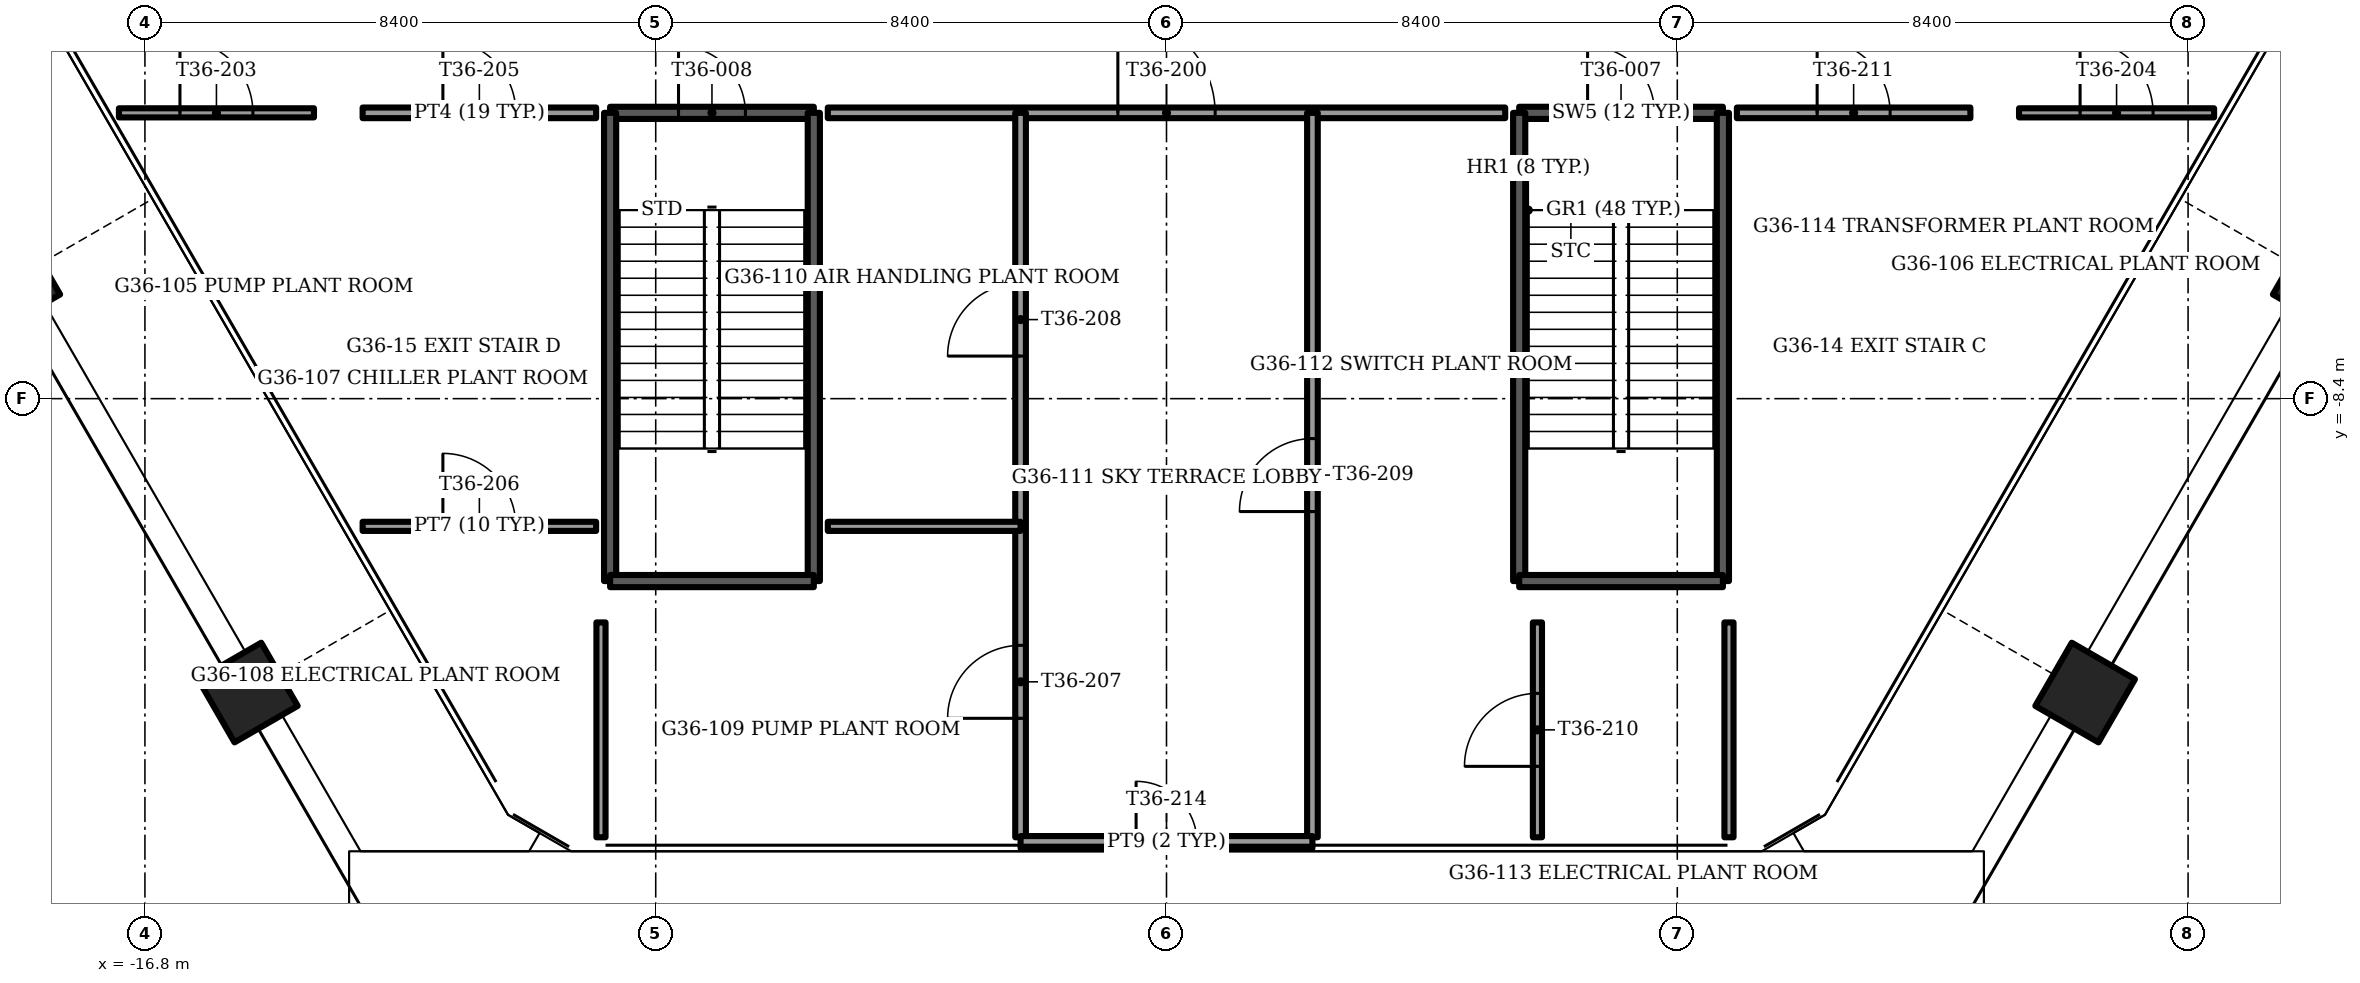
"""IFC4 building model, lengths in metres.
Left out: names, types, materials, properties, quantities, classifications, styles, units other than length and angle.
Written with IfcOpenShell. Run it as: python <this file> out.ifc"""

import sys

from ifc_helpers import new_model, si_unit, direction, frame, frame_2d, origin, origin_2d, place, context, subcontext, project, spatial, rectangle, extrude, element, fill, save


model = new_model("IFC4")
c1 = context("Model", 3, precision=1e-05, world=origin(), true_north=direction((0.0, 1.0)))
c2 = subcontext(c1, "Body", "Model", "MODEL_VIEW")
j1 = project(units=[si_unit("LENGTHUNIT", "METRE"), si_unit("PLANEANGLEUNIT", "RADIAN")], contexts=[c1])
p1 = place(None, origin())
s1 = spatial("IfcSite", under=j1, at=p1, CompositionType="ELEMENT")
p2 = place(p1, origin())
s2 = spatial("IfcBuilding", under=s1, at=p2, CompositionType="ELEMENT")
p3 = place(p2, frame((0.0, 0.0, 146.0)))
s3 = spatial("IfcBuildingStorey", under=s2, at=p3, CompositionType="ELEMENT", Elevation=146.0)
for number, where, z_axis, x_axis in (
    (1, (-19.014, -6.467, -1.2), (0.0, 0.0, 1.0), (-0.5, 0.866, 0.0)),
    (2, (-15.107, -13.233, -1.2), (0.0, 0.0, 1.0), (-0.5, 0.866, 0.0)),
    (3, (15.107, -13.233, -1.2), (0.0, 0.0, 1.0), (-0.5, -0.866, 0.0)),
    (4, (19.014, -6.467, -1.2), (0.0, 0.0, 1.0), (-0.5, -0.866, 0.0)),
):
    element("IfcColumn", number, at=place(p3, frame(where, z_axis=z_axis, x_axis=x_axis)), inside=s3, PredefinedType="COLUMN", context=c2, shape_type="SweptSolid", body=[
        extrude(rectangle(XDim=1.2, YDim=1.2, at=origin_2d()), origin(), (0.0, 0.0, 1.0), 5.0),
    ])
p4 = place(p3, frame((5.8, -3.7, -0.3), z_axis=(0.0, 0.0, 1.0), x_axis=(1.0, 0.0, 0.0)))
e5 = element("IfcWall", 5, at=p4, inside=s3, PredefinedType="SOLIDWALL", context=c2, shape_type="SweptSolid", body=[
    extrude(rectangle(XDim=3.35, YDim=0.2, at=frame_2d((1.675, 0.0))), origin(), (0.0, 0.0, 1.0), 5.0),
])
p5 = place(p4, frame((1.125, 0.0, 0.0)))
e6 = element("IfcOpeningElement", 6, at=p5, cuts=e5, PredefinedType="OPENING", context=c2, shape_type="SweptSolid", body=[
    extrude(rectangle(XDim=1.1, YDim=2.1, at=frame_2d((0.55, 1.05))), frame((0.0, 0.1, 0.0), z_axis=(0.0, -1.0, 0.0), x_axis=(1.0, 0.0, 0.0)), (0.0, 0.0, 1.0), 0.2),
])
for number, where, z_axis, x_axis in (
    (7, (5.8, -3.7, -0.3), (0.0, 0.0, 1.0), (0.0, -1.0, 0.0)),
    (8, (9.15, -3.7, -0.3), (0.0, 0.0, 1.0), (0.0, -1.0, 0.0)),
):
    element("IfcWall", number, at=place(p3, frame(where, z_axis=z_axis, x_axis=x_axis)), inside=s3, PredefinedType="SOLIDWALL", context=c2, shape_type="SweptSolid", body=[
        extrude(rectangle(XDim=7.7, YDim=0.2, at=frame_2d((3.85, 0.0))), origin(), (0.0, 0.0, 1.0), 5.0),
    ])
p6 = place(p3, frame((5.8, -11.4, -0.3), z_axis=(0.0, 0.0, 1.0), x_axis=(1.0, 0.0, 0.0)))
e9 = element("IfcWall", 9, at=p6, inside=s3, PredefinedType="SOLIDWALL", context=c2, shape_type="SweptSolid", body=[
    extrude(rectangle(XDim=3.35, YDim=0.2, at=frame_2d((1.675, 0.0))), origin(), (0.0, 0.0, 1.0), 5.0),
])
p7 = place(p3, frame((-9.15, -3.7, -0.3), z_axis=(0.0, 0.0, 1.0), x_axis=(1.0, 0.0, 0.0)))
e10 = element("IfcWall", 10, at=p7, inside=s3, PredefinedType="SOLIDWALL", context=c2, shape_type="SweptSolid", body=[
    extrude(rectangle(XDim=3.35, YDim=0.2, at=frame_2d((1.675, 0.0))), origin(), (0.0, 0.0, 1.0), 5.0),
])
p8 = place(p7, frame((1.125, 0.0, 0.0)))
e11 = element("IfcOpeningElement", 11, at=p8, cuts=e10, PredefinedType="OPENING", context=c2, shape_type="SweptSolid", body=[
    extrude(rectangle(XDim=1.1, YDim=2.1, at=frame_2d((0.55, 1.05))), frame((0.0, 0.1, 0.0), z_axis=(0.0, -1.0, 0.0), x_axis=(1.0, 0.0, 0.0)), (0.0, 0.0, 1.0), 0.2),
])
for number, where, z_axis, x_axis in (
    (12, (-9.15, -3.7, -0.3), (0.0, 0.0, 1.0), (0.0, -1.0, 0.0)),
    (13, (-5.8, -3.7, -0.3), (0.0, 0.0, 1.0), (0.0, -1.0, 0.0)),
):
    element("IfcWall", number, at=place(p3, frame(where, z_axis=z_axis, x_axis=x_axis)), inside=s3, PredefinedType="SOLIDWALL", context=c2, shape_type="SweptSolid", body=[
        extrude(rectangle(XDim=7.7, YDim=0.2, at=frame_2d((3.85, 0.0))), origin(), (0.0, 0.0, 1.0), 5.0),
    ])
p9 = place(p3, frame((-9.15, -11.4, -0.3), z_axis=(0.0, 0.0, 1.0), x_axis=(1.0, 0.0, 0.0)))
e14 = element("IfcWall", 14, at=p9, inside=s3, PredefinedType="SOLIDWALL", context=c2, shape_type="SweptSolid", body=[
    extrude(rectangle(XDim=3.35, YDim=0.2, at=frame_2d((1.675, 0.0))), origin(), (0.0, 0.0, 1.0), 5.0),
])
p10 = place(p3, frame((-13.22, -3.7, 0.0), z_axis=(0.0, 0.0, 1.0), x_axis=(1.0, 0.0, 0.0)))
e15 = element("IfcWall", 15, at=p10, inside=s3, PredefinedType="PARTITIONING", context=c2, shape_type="SweptSolid", body=[
    extrude(rectangle(XDim=3.84, YDim=0.175, at=frame_2d((1.92, 0.0))), origin(), (0.0, 0.0, 1.0), 4.7),
])
p11 = place(p10, frame((1.32, 0.0, 0.0)))
e16 = element("IfcOpeningElement", 16, at=p11, cuts=e15, PredefinedType="OPENING", context=c2, shape_type="SweptSolid", body=[
    extrude(rectangle(XDim=1.2, YDim=2.1, at=frame_2d((0.6, 1.05))), frame((0.0, 0.087, 0.0), z_axis=(0.0, -1.0, 0.0), x_axis=(1.0, 0.0, 0.0)), (0.0, 0.0, 1.0), 0.175),
])
p12 = place(p3, frame((-5.57, -3.7, 0.0), z_axis=(0.0, 0.0, 1.0), x_axis=(1.0, 0.0, 0.0)))
e17 = element("IfcWall", 17, at=p12, inside=s3, PredefinedType="PARTITIONING", context=c2, shape_type="SweptSolid", body=[
    extrude(rectangle(XDim=11.14, YDim=0.175, at=frame_2d((5.57, 0.0))), origin(), (0.0, 0.0, 1.0), 4.7),
])
p13 = place(p12, frame((4.77, 0.0, 0.0)))
e18 = element("IfcOpeningElement", 18, at=p13, cuts=e17, PredefinedType="OPENING", context=c2, shape_type="SweptSolid", body=[
    extrude(rectangle(XDim=1.6, YDim=2.1, at=frame_2d((0.8, 1.05))), frame((0.0, 0.087, 0.0), z_axis=(0.0, -1.0, 0.0), x_axis=(1.0, 0.0, 0.0)), (0.0, 0.0, 1.0), 0.175),
])
p14 = place(p3, frame((9.38, -3.7, 0.0), z_axis=(0.0, 0.0, 1.0), x_axis=(1.0, 0.0, 0.0)))
e19 = element("IfcWall", 19, at=p14, inside=s3, PredefinedType="PARTITIONING", context=c2, shape_type="SweptSolid", body=[
    extrude(rectangle(XDim=3.84, YDim=0.175, at=frame_2d((1.92, 0.0))), origin(), (0.0, 0.0, 1.0), 4.7),
])
p15 = place(p14, frame((1.32, 0.0, 0.0)))
e20 = element("IfcOpeningElement", 20, at=p15, cuts=e19, PredefinedType="OPENING", context=c2, shape_type="SweptSolid", body=[
    extrude(rectangle(XDim=1.2, YDim=2.1, at=frame_2d((0.6, 1.05))), frame((0.0, 0.087, 0.0), z_axis=(0.0, -1.0, 0.0), x_axis=(1.0, 0.0, 0.0)), (0.0, 0.0, 1.0), 0.175),
])
p16 = place(p3, frame((-2.4, -15.614, 0.0), z_axis=(0.0, 0.0, 1.0), x_axis=(0.0, 1.0, 0.0)))
e21 = element("IfcWall", 21, at=p16, inside=s3, PredefinedType="PARTITIONING", context=c2, shape_type="SweptSolid", body=[
    extrude(rectangle(XDim=11.914, YDim=0.175, at=frame_2d((5.957, 0.0))), origin(), (0.0, 0.0, 1.0), 4.7),
])
p17 = place(p16, frame((1.957, 0.0, 0.0)))
e22 = element("IfcOpeningElement", 22, at=p17, cuts=e21, PredefinedType="OPENING", context=c2, shape_type="SweptSolid", body=[
    extrude(rectangle(XDim=1.2, YDim=2.1, at=frame_2d((0.6, 1.05))), frame((0.0, 0.087, 0.0), z_axis=(0.0, -1.0, 0.0), x_axis=(1.0, 0.0, 0.0)), (0.0, 0.0, 1.0), 0.175),
])
p18 = place(p16, frame((7.914, 0.0, 0.0)))
e23 = element("IfcOpeningElement", 23, at=p18, cuts=e21, PredefinedType="OPENING", context=c2, shape_type="SweptSolid", body=[
    extrude(rectangle(XDim=1.2, YDim=2.1, at=frame_2d((0.6, 1.05))), frame((0.0, 0.087, 0.0), z_axis=(0.0, -1.0, 0.0), x_axis=(1.0, 0.0, 0.0)), (0.0, 0.0, 1.0), 0.175),
])
p19 = place(p3, frame((2.4, -15.614, 0.0), z_axis=(0.0, 0.0, 1.0), x_axis=(0.0, 1.0, 0.0)))
e24 = element("IfcWall", 24, at=p19, inside=s3, PredefinedType="PARTITIONING", context=c2, shape_type="SweptSolid", body=[
    extrude(rectangle(XDim=11.914, YDim=0.175, at=frame_2d((5.957, 0.0))), origin(), (0.0, 0.0, 1.0), 4.7),
])
p20 = place(p19, frame((5.357, 0.0, 0.0)))
e25 = element("IfcOpeningElement", 25, at=p20, cuts=e24, PredefinedType="OPENING", context=c2, shape_type="SweptSolid", body=[
    extrude(rectangle(XDim=1.2, YDim=2.1, at=frame_2d((0.6, 1.05))), frame((0.0, 0.087, 0.0), z_axis=(0.0, -1.0, 0.0), x_axis=(1.0, 0.0, 0.0)), (0.0, 0.0, 1.0), 0.175),
])
p21 = place(p3, frame((-13.22, -10.5, 0.0), z_axis=(0.0, 0.0, 1.0), x_axis=(1.0, 0.0, 0.0)))
e26 = element("IfcWall", 26, at=p21, inside=s3, PredefinedType="PARTITIONING", context=c2, shape_type="SweptSolid", body=[
    extrude(rectangle(XDim=3.84, YDim=0.15, at=frame_2d((1.92, 0.0))), origin(), (0.0, 0.0, 1.0), 4.7),
])
p22 = place(p21, frame((1.32, 0.0, 0.0)))
e27 = element("IfcOpeningElement", 27, at=p22, cuts=e26, PredefinedType="OPENING", context=c2, shape_type="SweptSolid", body=[
    extrude(rectangle(XDim=1.2, YDim=2.1, at=frame_2d((0.6, 1.05))), frame((0.0, 0.075, 0.0), z_axis=(0.0, -1.0, 0.0), x_axis=(1.0, 0.0, 0.0)), (0.0, 0.0, 1.0), 0.15),
])
p23 = place(p3, frame((-5.57, -10.5, 0.0), z_axis=(0.0, 0.0, 1.0), x_axis=(1.0, 0.0, 0.0)))
e28 = element("IfcWall", 28, at=p23, inside=s3, PredefinedType="PARTITIONING", context=c2, shape_type="SweptSolid", body=[
    extrude(rectangle(XDim=3.17, YDim=0.15, at=frame_2d((1.585, 0.0))), origin(), (0.0, 0.0, 1.0), 4.7),
])
p24 = place(p3, frame((-17.228, -3.7, 0.0), z_axis=(0.0, 0.0, 1.0), x_axis=(1.0, 0.0, 0.0)))
e29 = element("IfcWall", 29, at=p24, inside=s3, PredefinedType="PARTITIONING", context=c2, shape_type="SweptSolid", body=[
    extrude(rectangle(XDim=3.208, YDim=0.15, at=frame_2d((1.604, 0.0))), origin(), (0.0, 0.0, 1.0), 4.7),
])
p25 = place(p24, frame((1.004, 0.0, 0.0)))
e30 = element("IfcOpeningElement", 30, at=p25, cuts=e29, PredefinedType="OPENING", context=c2, shape_type="SweptSolid", body=[
    extrude(rectangle(XDim=1.2, YDim=2.1, at=frame_2d((0.6, 1.05))), frame((0.0, 0.075, 0.0), z_axis=(0.0, -1.0, 0.0), x_axis=(1.0, 0.0, 0.0)), (0.0, 0.0, 1.0), 0.15),
])
p26 = place(p3, frame((14.02, -3.7, 0.0), z_axis=(0.0, 0.0, 1.0), x_axis=(1.0, 0.0, 0.0)))
e31 = element("IfcWall", 31, at=p26, inside=s3, PredefinedType="PARTITIONING", context=c2, shape_type="SweptSolid", body=[
    extrude(rectangle(XDim=3.208, YDim=0.15, at=frame_2d((1.604, 0.0))), origin(), (0.0, 0.0, 1.0), 4.7),
])
p27 = place(p26, frame((1.004, 0.0, 0.0)))
e32 = element("IfcOpeningElement", 32, at=p27, cuts=e31, PredefinedType="OPENING", context=c2, shape_type="SweptSolid", body=[
    extrude(rectangle(XDim=1.2, YDim=2.1, at=frame_2d((0.6, 1.05))), frame((0.0, 0.075, 0.0), z_axis=(0.0, -1.0, 0.0), x_axis=(1.0, 0.0, 0.0)), (0.0, 0.0, 1.0), 0.15),
])
p28 = place(p3, frame((-9.3, -15.614, 0.0), z_axis=(0.0, 0.0, 1.0), x_axis=(0.0, 1.0, 0.0)))
e33 = element("IfcWall", 33, at=p28, inside=s3, PredefinedType="PARTITIONING", context=c2, shape_type="SweptSolid", body=[
    extrude(rectangle(XDim=3.533, YDim=0.15, at=frame_2d((1.767, 0.0))), origin(), (0.0, 0.0, 1.0), 4.7),
])
p29 = place(p3, frame((6.1, -15.614, 0.0), z_axis=(0.0, 0.0, 1.0), x_axis=(0.0, 1.0, 0.0)))
e34 = element("IfcWall", 34, at=p29, inside=s3, PredefinedType="PARTITIONING", context=c2, shape_type="SweptSolid", body=[
    extrude(rectangle(XDim=3.533, YDim=0.15, at=frame_2d((1.767, 0.0))), origin(), (0.0, 0.0, 1.0), 4.7),
])
p30 = place(p29, frame((1.167, 0.0, 0.0)))
e35 = element("IfcOpeningElement", 35, at=p30, cuts=e34, PredefinedType="OPENING", context=c2, shape_type="SweptSolid", body=[
    extrude(rectangle(XDim=1.2, YDim=2.1, at=frame_2d((0.6, 1.05))), frame((0.0, 0.075, 0.0), z_axis=(0.0, -1.0, 0.0), x_axis=(1.0, 0.0, 0.0)), (0.0, 0.0, 1.0), 0.15),
])
p31 = place(p3, frame((9.25, -15.614, 0.0), z_axis=(0.0, 0.0, 1.0), x_axis=(0.0, 1.0, 0.0)))
e36 = element("IfcWall", 36, at=p31, inside=s3, PredefinedType="PARTITIONING", context=c2, shape_type="SweptSolid", body=[
    extrude(rectangle(XDim=3.533, YDim=0.15, at=frame_2d((1.767, 0.0))), origin(), (0.0, 0.0, 1.0), 4.7),
])
p32 = place(p3, frame((-2.4, -15.694, 0.0), z_axis=(0.0, 0.0, 1.0), x_axis=(1.0, 0.0, 0.0)))
e37 = element("IfcWall", 37, at=p32, inside=s3, PredefinedType="PARTITIONING", context=c2, shape_type="SweptSolid", body=[
    extrude(rectangle(XDim=4.8, YDim=0.2, at=frame_2d((2.4, 0.0))), origin(), (0.0, 0.0, 1.0), 4.7),
])
p33 = place(p32, frame((1.9, 0.0, 0.0)))
e38 = element("IfcOpeningElement", 38, at=p33, cuts=e37, PredefinedType="OPENING", context=c2, shape_type="SweptSolid", body=[
    extrude(rectangle(XDim=1.0, YDim=2.1, at=frame_2d((0.5, 1.05))), frame((0.0, 0.1, 0.0), z_axis=(0.0, -1.0, 0.0), x_axis=(1.0, 0.0, 0.0)), (0.0, 0.0, 1.0), 0.2),
])
p34 = place(p5, origin())
e39 = element("IfcDoor", 39, at=p34, inside=s3, OperationType="SINGLE_SWING_LEFT", PredefinedType="DOOR", context=c2, shape_type="SweptSolid", body=[
    extrude(rectangle(XDim=1.1, YDim=2.1, at=frame_2d((0.55, 1.05))), frame((0.0, 0.025, 0.0), z_axis=(0.0, -1.0, 0.0), x_axis=(1.0, 0.0, 0.0)), (0.0, 0.0, 1.0), 0.05),
])
fill(e6, e39)
p35 = place(p8, origin())
e40 = element("IfcDoor", 40, at=p35, inside=s3, OperationType="SINGLE_SWING_LEFT", PredefinedType="DOOR", context=c2, shape_type="SweptSolid", body=[
    extrude(rectangle(XDim=1.1, YDim=2.1, at=frame_2d((0.55, 1.05))), frame((0.0, 0.025, 0.0), z_axis=(0.0, -1.0, 0.0), x_axis=(1.0, 0.0, 0.0)), (0.0, 0.0, 1.0), 0.05),
])
fill(e11, e40)
p36 = place(p13, origin())
e41 = element("IfcDoor", 41, at=p36, inside=s3, OperationType="DOUBLE_DOOR_SINGLE_SWING", PredefinedType="DOOR", context=c2, shape_type="SweptSolid", body=[
    extrude(rectangle(XDim=1.6, YDim=2.1, at=frame_2d((0.8, 1.05))), frame((0.0, 0.025, 0.0), z_axis=(0.0, -1.0, 0.0), x_axis=(1.0, 0.0, 0.0)), (0.0, 0.0, 1.0), 0.05),
])
fill(e18, e41)
p37 = place(p25, origin())
e42 = element("IfcDoor", 42, at=p37, inside=s3, OperationType="SINGLE_SWING_LEFT", PredefinedType="DOOR", context=c2, shape_type="SweptSolid", body=[
    extrude(rectangle(XDim=1.2, YDim=2.1, at=frame_2d((0.6, 1.05))), frame((0.0, 0.025, 0.0), z_axis=(0.0, -1.0, 0.0), x_axis=(1.0, 0.0, 0.0)), (0.0, 0.0, 1.0), 0.05),
])
fill(e30, e42)
p38 = place(p27, origin())
e43 = element("IfcDoor", 43, at=p38, inside=s3, OperationType="SINGLE_SWING_RIGHT", PredefinedType="DOOR", context=c2, shape_type="SweptSolid", body=[
    extrude(rectangle(XDim=1.2, YDim=2.1, at=frame_2d((0.6, 1.05))), frame((0.0, 0.025, 0.0), z_axis=(0.0, -1.0, 0.0), x_axis=(1.0, 0.0, 0.0)), (0.0, 0.0, 1.0), 0.05),
])
fill(e32, e43)
p39 = place(p11, origin())
e44 = element("IfcDoor", 44, at=p39, inside=s3, OperationType="SINGLE_SWING_LEFT", PredefinedType="DOOR", context=c2, shape_type="SweptSolid", body=[
    extrude(rectangle(XDim=1.2, YDim=2.1, at=frame_2d((0.6, 1.05))), frame((0.0, 0.025, 0.0), z_axis=(0.0, -1.0, 0.0), x_axis=(1.0, 0.0, 0.0)), (0.0, 0.0, 1.0), 0.05),
])
fill(e16, e44)
p40 = place(p22, origin())
e45 = element("IfcDoor", 45, at=p40, inside=s3, OperationType="SINGLE_SWING_RIGHT", PredefinedType="DOOR", context=c2, shape_type="SweptSolid", body=[
    extrude(rectangle(XDim=1.2, YDim=2.1, at=frame_2d((0.6, 1.05))), frame((0.0, 0.025, 0.0), z_axis=(0.0, -1.0, 0.0), x_axis=(1.0, 0.0, 0.0)), (0.0, 0.0, 1.0), 0.05),
])
fill(e27, e45)
p41 = place(p17, origin())
e46 = element("IfcDoor", 46, at=p41, inside=s3, OperationType="SINGLE_SWING_LEFT", PredefinedType="DOOR", context=c2, shape_type="SweptSolid", body=[
    extrude(rectangle(XDim=1.2, YDim=2.1, at=frame_2d((0.6, 1.05))), frame((0.0, 0.025, 0.0), z_axis=(0.0, -1.0, 0.0), x_axis=(1.0, 0.0, 0.0)), (0.0, 0.0, 1.0), 0.05),
])
fill(e22, e46)
p42 = place(p18, origin())
e47 = element("IfcDoor", 47, at=p42, inside=s3, OperationType="SINGLE_SWING_RIGHT", PredefinedType="DOOR", context=c2, shape_type="SweptSolid", body=[
    extrude(rectangle(XDim=1.2, YDim=2.1, at=frame_2d((0.6, 1.05))), frame((0.0, 0.025, 0.0), z_axis=(0.0, -1.0, 0.0), x_axis=(1.0, 0.0, 0.0)), (0.0, 0.0, 1.0), 0.05),
])
fill(e23, e47)
p43 = place(p20, origin())
e48 = element("IfcDoor", 48, at=p43, inside=s3, OperationType="SINGLE_SWING_LEFT", PredefinedType="DOOR", context=c2, shape_type="SweptSolid", body=[
    extrude(rectangle(XDim=1.2, YDim=2.1, at=frame_2d((0.6, 1.05))), frame((0.0, 0.025, 0.0), z_axis=(0.0, -1.0, 0.0), x_axis=(1.0, 0.0, 0.0)), (0.0, 0.0, 1.0), 0.05),
])
fill(e25, e48)
p44 = place(p30, origin())
e49 = element("IfcDoor", 49, at=p44, inside=s3, OperationType="SINGLE_SWING_RIGHT", PredefinedType="DOOR", context=c2, shape_type="SweptSolid", body=[
    extrude(rectangle(XDim=1.2, YDim=2.1, at=frame_2d((0.6, 1.05))), frame((0.0, 0.025, 0.0), z_axis=(0.0, -1.0, 0.0), x_axis=(1.0, 0.0, 0.0)), (0.0, 0.0, 1.0), 0.05),
])
fill(e35, e49)
p45 = place(p15, origin())
e50 = element("IfcDoor", 50, at=p45, inside=s3, OperationType="SINGLE_SWING_LEFT", PredefinedType="DOOR", context=c2, shape_type="SweptSolid", body=[
    extrude(rectangle(XDim=1.2, YDim=2.1, at=frame_2d((0.6, 1.05))), frame((0.0, 0.025, 0.0), z_axis=(0.0, -1.0, 0.0), x_axis=(1.0, 0.0, 0.0)), (0.0, 0.0, 1.0), 0.05),
])
fill(e20, e50)
p46 = place(p33, origin())
e51 = element("IfcDoor", 51, at=p46, inside=s3, OperationType="SINGLE_SWING_LEFT", PredefinedType="DOOR", context=c2, shape_type="SweptSolid", body=[
    extrude(rectangle(XDim=1.0, YDim=2.1, at=frame_2d((0.5, 1.05))), frame((0.0, 0.025, 0.0), z_axis=(0.0, -1.0, 0.0), x_axis=(1.0, 0.0, 0.0)), (0.0, 0.0, 1.0), 0.05),
])
fill(e38, e51)
save(model, sys.argv[1])
